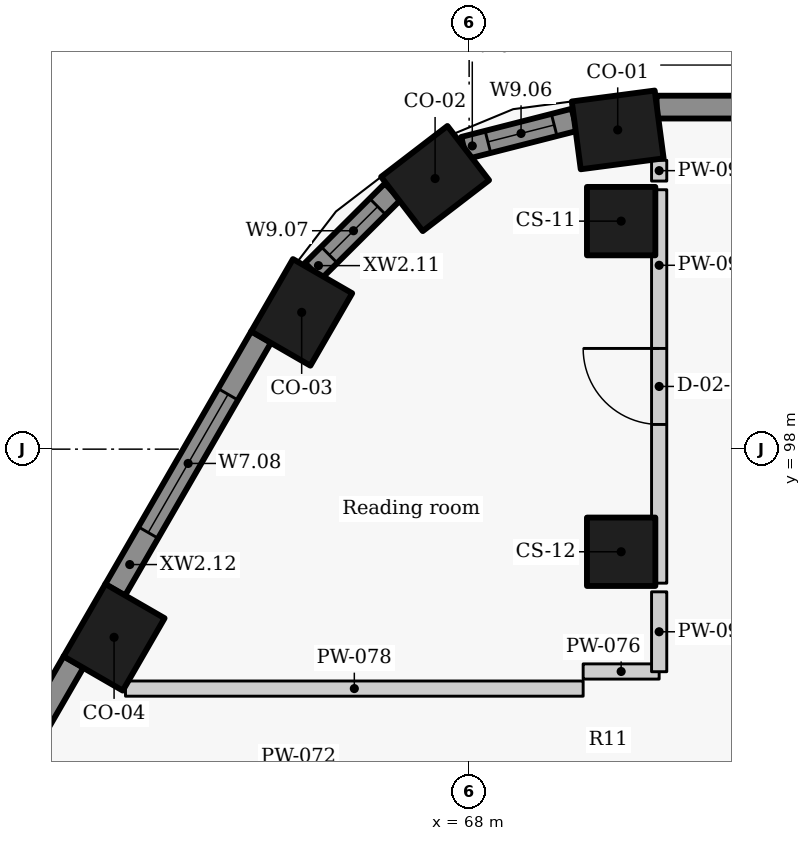
"""IFC4 building model, lengths in metres.
Left out: names, types, materials, properties, quantities, classifications, styles, units other than length and angle.
Written with IfcOpenShell. Run it as: python <this file> out.ifc"""

import sys

from ifc_helpers import new_model, si_unit, direction, frame, frame_2d, origin, origin_2d, place, context, subcontext, project, spatial, rectangle, extrude, element, fill, save


model = new_model("IFC4")
c1 = context("Model", 3, precision=1e-05, world=origin(), true_north=direction((0.0, 1.0)))
c2 = subcontext(c1, "Body", "Model", "MODEL_VIEW")
j1 = project(units=[si_unit("LENGTHUNIT", "METRE"), si_unit("PLANEANGLEUNIT", "RADIAN")], contexts=[c1])
p1 = place(None, origin())
s1 = spatial("IfcSite", under=j1, at=p1, CompositionType="ELEMENT")
p2 = place(p1, origin())
s2 = spatial("IfcBuilding", under=s1, at=p2, CompositionType="ELEMENT")
p3 = place(p2, frame((0.0, 0.0, 226.2)))
s3 = spatial("IfcBuildingStorey", under=s2, at=p3, CompositionType="ELEMENT", Elevation=226.2)
for number, where, z_axis, x_axis in (
    (1, (69.955, 102.2, 0.0), (0.0, 0.0, 1.0), (-0.991, -0.131, 0.0)),
    (2, (67.552, 101.56, 0.0), (0.0, 0.0, 1.0), (-0.793, -0.609, 0.0)),
    (3, (65.797, 99.8, 0.0), (0.0, 0.0, 1.0), (-0.5, -0.866, 0.0)),
    (4, (63.329, 95.525, 0.0), (0.0, 0.0, 1.0), (-0.5, -0.866, 0.0)),
):
    element("IfcColumn", number, at=place(p3, frame(where, z_axis=z_axis, x_axis=x_axis)), inside=s3, PredefinedType="COLUMN", context=c2, shape_type="SweptSolid", body=[
        extrude(rectangle(XDim=1.1, YDim=0.9, at=origin_2d()), origin(), (0.0, 0.0, 1.0), 3.3),
    ])
for number, where, z_axis, x_axis in (
    (5, (70.0, 101.0, 0.0), (0.0, 0.0, 1.0), (0.0, -1.0, 0.0)),
    (6, (70.0, 96.65, 0.0), (0.0, 0.0, 1.0), (0.0, -1.0, 0.0)),
):
    element("IfcColumn", number, at=place(p3, frame(where, z_axis=z_axis, x_axis=x_axis)), inside=s3, PredefinedType="COLUMN", context=c2, shape_type="SweptSolid", body=[
        extrude(rectangle(XDim=0.9, YDim=0.9, at=origin_2d()), origin(), (0.0, 0.0, 1.0), 3.3),
    ])
p4 = place(p3, frame((89.499, 102.5, 0.0), z_axis=(0.0, 0.0, 1.0), x_axis=(-1.0, 0.0, 0.0)))
e7 = element("IfcWall", 7, at=p4, inside=s3, PredefinedType="SOLIDWALL", context=c2, shape_type="SweptSolid", body=[
    extrude(rectangle(XDim=19.033, YDim=0.3, at=frame_2d((9.517, 0.0))), origin(), (0.0, 0.0, 1.0), 2.425),
])
p5 = place(p3, frame((69.386, 102.333, 0.0), z_axis=(0.0, 0.0, 1.0), x_axis=(-0.968895303033, -0.247470991757, 0.0)))
e8 = element("IfcWall", 8, at=p5, inside=s3, PredefinedType="SOLIDWALL", context=c2, shape_type="SweptSolid", body=[
    extrude(rectangle(XDim=1.5, YDim=0.3, at=frame_2d((0.75, 0.0))), origin(), (0.0, 0.0, 1.0), 2.425),
])
p6 = place(p5, frame((0.276, 0.0, 0.9)))
e9 = element("IfcOpeningElement", 9, at=p6, cuts=e8, PredefinedType="OPENING", context=c2, shape_type="SweptSolid", body=[
    extrude(rectangle(XDim=0.9, YDim=1.1, at=frame_2d((0.45, 0.55))), frame((0.0, 0.16, 0.0), z_axis=(0.0, -1.0, 0.0), x_axis=(1.0, 0.0, 0.0)), (0.0, 0.0, 1.0), 0.32),
])
p7 = place(p3, frame((66.996, 101.388, 0.0), z_axis=(0.0, 0.0, 1.0), x_axis=(-0.708589353117, -0.705621094249, 0.0)))
e10 = element("IfcWall", 10, at=p7, inside=s3, PredefinedType="SOLIDWALL", context=c2, shape_type="SweptSolid", body=[
    extrude(rectangle(XDim=1.48, YDim=0.3, at=frame_2d((0.74, 0.0))), origin(), (0.0, 0.0, 1.0), 2.425),
])
p8 = place(p7, frame((0.28, 0.0, 0.9)))
e11 = element("IfcOpeningElement", 11, at=p8, cuts=e10, PredefinedType="OPENING", context=c2, shape_type="SweptSolid", body=[
    extrude(rectangle(XDim=0.9, YDim=1.1, at=frame_2d((0.45, 0.55))), frame((0.0, 0.16, 0.0), z_axis=(0.0, -1.0, 0.0), x_axis=(1.0, 0.0, 0.0)), (0.0, 0.0, 1.0), 0.32),
])
p9 = place(p3, frame((65.264, 99.477, 0.0), z_axis=(0.0, 0.0, 1.0), x_axis=(-0.499984490703, -0.866034357896, 0.0)))
e12 = element("IfcWall", 12, at=p9, inside=s3, PredefinedType="SOLIDWALL", context=c2, shape_type="SweptSolid", body=[
    extrude(rectangle(XDim=3.844, YDim=0.3, at=frame_2d((1.922, 0.0))), origin(), (0.0, 0.0, 1.0), 2.425),
])
p10 = place(p9, frame((0.872, 0.0, 0.9)))
e13 = element("IfcOpeningElement", 13, at=p10, cuts=e12, PredefinedType="OPENING", context=c2, shape_type="SweptSolid", body=[
    extrude(rectangle(XDim=2.1, YDim=1.1, at=frame_2d((1.05, 0.55))), frame((0.0, 0.16, 0.0), z_axis=(0.0, -1.0, 0.0), x_axis=(1.0, 0.0, 0.0)), (0.0, 0.0, 1.0), 0.32),
])
p11 = place(p3, frame((62.796, 95.202, 0.0), z_axis=(0.0, 0.0, 1.0), x_axis=(-0.499984490703, -0.866034357896, 0.0)))
e14 = element("IfcWall", 14, at=p11, inside=s3, PredefinedType="SOLIDWALL", context=c2, shape_type="SweptSolid", body=[
    extrude(rectangle(XDim=3.844, YDim=0.3, at=frame_2d((1.922, 0.0))), origin(), (0.0, 0.0, 1.0), 2.425),
])
p12 = place(p11, frame((2.215, 0.0, 0.9)))
e15 = element("IfcOpeningElement", 15, at=p12, cuts=e14, PredefinedType="OPENING", context=c2, shape_type="SweptSolid", body=[
    extrude(rectangle(XDim=1.2, YDim=1.1, at=frame_2d((0.6, 0.55))), frame((0.0, 0.16, 0.0), z_axis=(0.0, -1.0, 0.0), x_axis=(1.0, 0.0, 0.0)), (0.0, 0.0, 1.0), 0.32),
])
p13 = place(p3, frame((69.5, 95.075, 0.0), z_axis=(0.0, 0.0, 1.0), x_axis=(1.0, 0.0, 0.0)))
e16 = element("IfcWall", 16, at=p13, inside=s3, PredefinedType="PARTITIONING", context=c2, shape_type="SweptSolid", body=[
    extrude(rectangle(XDim=1.0, YDim=0.2, at=frame_2d((0.5, 0.0))), origin(), (0.0, 0.0, 1.0), 2.505),
])
p14 = place(p3, frame((63.479, 94.85, 0.0), z_axis=(0.0, 0.0, 1.0), x_axis=(1.0, 0.0, 0.0)))
e17 = element("IfcWall", 17, at=p14, inside=s3, PredefinedType="PARTITIONING", context=c2, shape_type="SweptSolid", body=[
    extrude(rectangle(XDim=6.021, YDim=0.2, at=frame_2d((3.01, 0.0))), origin(), (0.0, 0.0, 1.0), 3.025),
])
p15 = place(p3, frame((70.5, 95.072, 0.0), z_axis=(0.0, 0.0, 1.0), x_axis=(0.0, 1.0, 0.0)))
e18 = element("IfcWall", 18, at=p15, inside=s3, PredefinedType="PARTITIONING", context=c2, shape_type="SweptSolid", body=[
    extrude(rectangle(XDim=1.051, YDim=0.2, at=frame_2d((0.525, 0.0))), origin(), (0.0, 0.0, 1.0), 3.025),
])
p16 = place(p3, frame((70.5, 96.237, 0.0), z_axis=(0.0, 0.0, 1.0), x_axis=(0.0, 1.0, 0.0)))
e19 = element("IfcWall", 19, at=p16, inside=s3, PredefinedType="PARTITIONING", context=c2, shape_type="SweptSolid", body=[
    extrude(rectangle(XDim=5.176, YDim=0.2, at=frame_2d((2.588, 0.0))), origin(), (0.0, 0.0, 1.0), 3.025),
])
p17 = place(p16, frame((2.088, 0.0, 0.0)))
e20 = element("IfcOpeningElement", 20, at=p17, cuts=e19, PredefinedType="OPENING", context=c2, shape_type="SweptSolid", body=[
    extrude(rectangle(XDim=1.0, YDim=2.1, at=frame_2d((0.5, 1.05))), frame((0.0, 0.11, 0.0), z_axis=(0.0, -1.0, 0.0), x_axis=(1.0, 0.0, 0.0)), (0.0, 0.0, 1.0), 0.22),
])
p18 = place(p3, frame((70.5, 101.527, 0.0), z_axis=(0.0, 0.0, 1.0), x_axis=(0.0, 1.0, 0.0)))
e21 = element("IfcWall", 21, at=p18, inside=s3, PredefinedType="PARTITIONING", context=c2, shape_type="SweptSolid", body=[
    extrude(rectangle(XDim=0.274, YDim=0.2, at=frame_2d((0.137, 0.0))), origin(), (0.0, 0.0, 1.0), 3.025),
])
p19 = place(p6, origin())
e22 = element("IfcWindow", 22, at=p19, inside=s3, PartitioningType="SINGLE_PANEL", PredefinedType="WINDOW", context=c2, shape_type="SweptSolid", body=[
    extrude(rectangle(XDim=0.9, YDim=1.1, at=frame_2d((0.45, 0.55))), frame((0.0, 0.03, 0.0), z_axis=(0.0, -1.0, 0.0), x_axis=(1.0, 0.0, 0.0)), (0.0, 0.0, 1.0), 0.06),
])
fill(e9, e22)
p20 = place(p8, origin())
e23 = element("IfcWindow", 23, at=p20, inside=s3, PartitioningType="SINGLE_PANEL", PredefinedType="WINDOW", context=c2, shape_type="SweptSolid", body=[
    extrude(rectangle(XDim=0.9, YDim=1.1, at=frame_2d((0.45, 0.55))), frame((0.0, 0.03, 0.0), z_axis=(0.0, -1.0, 0.0), x_axis=(1.0, 0.0, 0.0)), (0.0, 0.0, 1.0), 0.06),
])
fill(e11, e23)
p21 = place(p10, origin())
e24 = element("IfcWindow", 24, at=p21, inside=s3, PartitioningType="SINGLE_PANEL", PredefinedType="WINDOW", context=c2, shape_type="SweptSolid", body=[
    extrude(rectangle(XDim=2.1, YDim=1.1, at=frame_2d((1.05, 0.55))), frame((0.0, 0.03, 0.0), z_axis=(0.0, -1.0, 0.0), x_axis=(1.0, 0.0, 0.0)), (0.0, 0.0, 1.0), 0.06),
])
fill(e13, e24)
p22 = place(p17, origin())
e25 = element("IfcDoor", 25, at=p22, inside=s3, OperationType="SINGLE_SWING_RIGHT", PredefinedType="DOOR", context=c2, shape_type="SweptSolid", body=[
    extrude(rectangle(XDim=1.0, YDim=2.1, at=frame_2d((0.5, 1.05))), frame((0.0, 0.025, 0.0), z_axis=(0.0, -1.0, 0.0), x_axis=(1.0, 0.0, 0.0)), (0.0, 0.0, 1.0), 0.05),
])
fill(e20, e25)
save(model, sys.argv[1])
